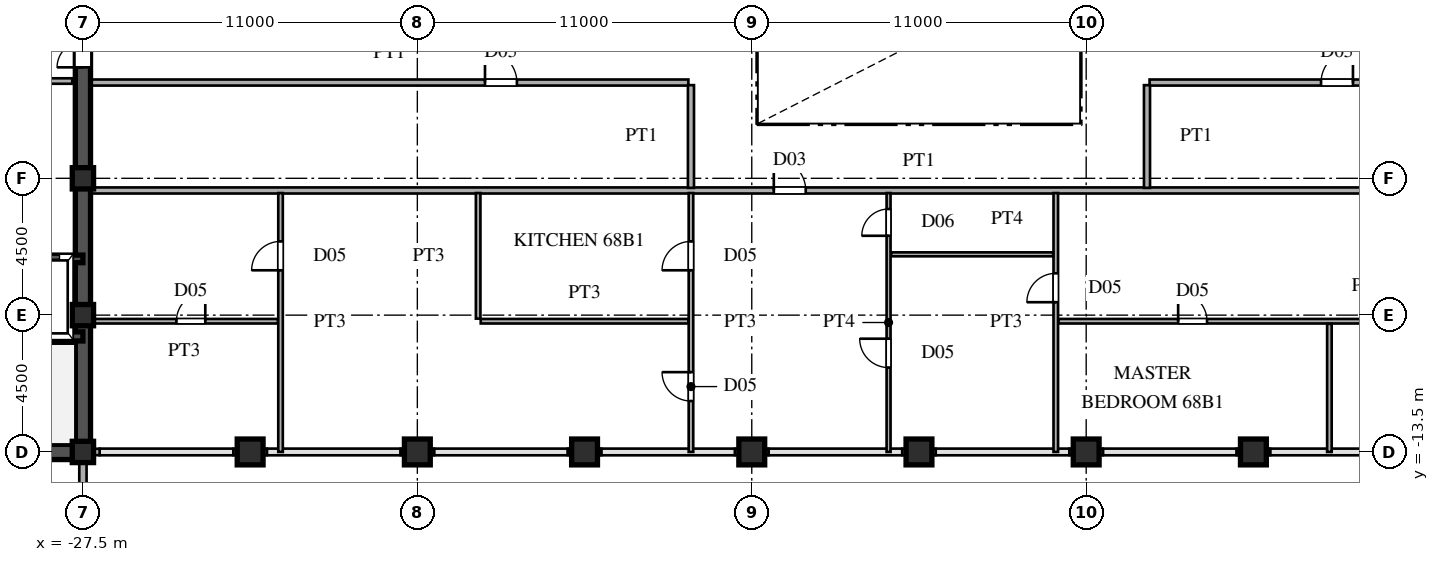
"""IFC4 building model, lengths in metres.
Left out: names, types, materials, properties, quantities, classifications, styles, units other than length and angle.
Written with IfcOpenShell. Run it as: python <this file> out.ifc"""

import sys

from ifc_helpers import new_model, si_unit, direction, frame, frame_2d, origin, origin_2d, place, context, subcontext, project, spatial, rectangle, hollow_rectangle, extrude, source, transform, mapped, element, fill, save


model = new_model("IFC4")
c1 = context("Model", 3, precision=1e-05, world=origin(), true_north=direction((0.0, 1.0)))
c2 = subcontext(c1, "Body", "Model", "MODEL_VIEW")
j1 = project(units=[si_unit("LENGTHUNIT", "METRE"), si_unit("PLANEANGLEUNIT", "RADIAN")], contexts=[c1])
p1 = place(None, origin())
s1 = spatial("IfcSite", under=j1, at=p1, CompositionType="ELEMENT")
p2 = place(p1, origin())
s2 = spatial("IfcBuilding", under=s1, at=p2, CompositionType="ELEMENT")
p3 = place(p2, frame((0.0, 0.0, 258.15)))
s3 = spatial("IfcBuildingStorey", under=s2, at=p3, CompositionType="ELEMENT", Elevation=258.15)
m1 = source(origin(), c2, "Body", "SweptSolid", [
    extrude(hollow_rectangle(XDim=0.7, YDim=0.7, WallThickness=0.03, at=origin_2d()), origin(), (0.0, 0.0, 1.0), 3.75),
])
for number, where, z_axis, x_axis in (
    (1, (-27.5, -13.5, 0.0), (0.0, 0.0, 1.0), (1.0, 0.0, 0.0)),
    (2, (-27.5, -9.0, 0.0), (0.0, 0.0, 1.0), (1.0, 0.0, 0.0)),
    (3, (-27.5, -4.5, 0.0), (0.0, 0.0, 1.0), (1.0, 0.0, 0.0)),
):
    element("IfcColumn", number, at=place(p3, frame(where, z_axis=z_axis, x_axis=x_axis)), inside=s3, PredefinedType="COLUMN", context=c2, shape_type="MappedRepresentation", body=[
        mapped(m1, transform((0.0, 0.0, 0.0), scale=1.0)),
    ])
m2 = source(origin(), c2, "Body", "SweptSolid", [
    extrude(hollow_rectangle(XDim=0.85, YDim=0.85, WallThickness=0.036, at=origin_2d()), origin(), (0.0, 0.0, 1.0), 3.75),
])
for number, where, z_axis, x_axis in (
    (4, (-22.0, -13.5, 0.0), (0.0, 0.0, 1.0), (1.0, 0.0, 0.0)),
    (5, (-16.5, -13.5, 0.0), (0.0, 0.0, 1.0), (1.0, 0.0, 0.0)),
    (6, (-11.0, -13.5, 0.0), (0.0, 0.0, 1.0), (1.0, 0.0, 0.0)),
    (7, (-5.5, -13.5, 0.0), (0.0, 0.0, 1.0), (1.0, 0.0, 0.0)),
    (8, (0.0, -13.5, 0.0), (0.0, 0.0, 1.0), (1.0, 0.0, 0.0)),
    (9, (5.5, -13.5, 0.0), (0.0, 0.0, 1.0), (1.0, 0.0, 0.0)),
    (10, (11.0, -13.5, 0.0), (0.0, 0.0, 1.0), (1.0, 0.0, 0.0)),
):
    element("IfcColumn", number, at=place(p3, frame(where, z_axis=z_axis, x_axis=x_axis)), inside=s3, PredefinedType="COLUMN", context=c2, shape_type="MappedRepresentation", body=[
        mapped(m2, transform((0.0, 0.0, 0.0), scale=1.0)),
    ])
p4 = place(p3, frame((-27.5, -15.98, 0.0), z_axis=(0.0, 0.0, 1.0), x_axis=(0.0, 1.0, 0.0)))
e11 = element("IfcWall", 11, at=p4, inside=s3, PredefinedType="SOLIDWALL", context=c2, shape_type="SweptSolid", body=[
    extrude(rectangle(XDim=1.605, YDim=0.24, at=frame_2d((0.803, 0.0))), origin(), (0.0, 0.0, 1.0), 3.53),
])
p5 = place(p3, frame((-27.5, -14.375, 0.0), z_axis=(0.0, 0.0, 1.0), x_axis=(0.0, 1.0, 0.0)))
e12 = element("IfcWall", 12, at=p5, inside=s3, PredefinedType="SOLIDWALL", context=c2, shape_type="SweptSolid", body=[
    extrude(rectangle(XDim=0.62, YDim=0.24, at=frame_2d((0.31, 0.0))), origin(), (0.0, 0.0, 1.0), 3.03),
])
p6 = place(p3, frame((-27.49, -13.5, 0.0), z_axis=(0.0, 0.0, 1.0), x_axis=(1.0, 0.0, 0.0)))
e13 = element("IfcWall", 13, at=p6, inside=s3, PredefinedType="SOLIDWALL", context=c2, shape_type="SweptSolid", body=[
    extrude(rectangle(XDim=0.54, YDim=0.21, at=frame_2d((0.27, 0.0))), origin(), (0.0, 0.0, 1.0), 3.03),
])
for number, where, z_axis, x_axis in (
    (14, (-22.55, -13.5, 0.0), (0.0, 0.0, 1.0), (1.0, 0.0, 0.0)),
    (15, (-17.05, -13.5, 0.0), (0.0, 0.0, 1.0), (1.0, 0.0, 0.0)),
    (16, (-11.55, -13.5, 0.0), (0.0, 0.0, 1.0), (1.0, 0.0, 0.0)),
    (17, (-6.05, -13.5, 0.0), (0.0, 0.0, 1.0), (1.0, 0.0, 0.0)),
    (18, (-0.55, -13.5, 0.0), (0.0, 0.0, 1.0), (1.0, 0.0, 0.0)),
    (19, (4.95, -13.5, 0.0), (0.0, 0.0, 1.0), (1.0, 0.0, 0.0)),
    (20, (10.45, -13.5, 0.0), (0.0, 0.0, 1.0), (1.0, 0.0, 0.0)),
):
    element("IfcWall", number, at=place(p3, frame(where, z_axis=z_axis, x_axis=x_axis)), inside=s3, PredefinedType="SOLIDWALL", context=c2, shape_type="SweptSolid", body=[
        extrude(rectangle(XDim=1.1, YDim=0.21, at=frame_2d((0.55, 0.0))), origin(), (0.0, 0.0, 1.0), 3.03),
    ])
p7 = place(p3, frame((-27.5, -13.5, 0.0), z_axis=(0.0, 0.0, 1.0), x_axis=(0.0, 1.0, 0.0)))
e21 = element("IfcWall", 21, at=p7, inside=s3, PredefinedType="SHEAR", context=c2, shape_type="SweptSolid", body=[
    extrude(rectangle(XDim=12.2, YDim=0.5, at=frame_2d((6.1, 0.0))), origin(), (0.0, 0.0, 1.0), 3.53),
])
p8 = place(p3, frame((-27.5, -1.3, 0.0), z_axis=(0.0, 0.0, 1.0), x_axis=(0.0, 1.0, 0.0)))
e22 = element("IfcWall", 22, at=p8, inside=s3, PredefinedType="SHEAR", context=c2, shape_type="SweptSolid", body=[
    extrude(rectangle(XDim=2.6, YDim=0.5, at=frame_2d((1.3, 0.0))), origin(), (0.0, 0.0, 1.0), 3.53),
])
p9 = place(p8, frame((0.45, 0.0, 0.0)))
e23 = element("IfcOpeningElement", 23, at=p9, cuts=e22, PredefinedType="OPENING", context=c2, shape_type="SweptSolid", body=[
    extrude(rectangle(XDim=1.7, YDim=2.35, at=frame_2d((0.85, 1.175))), frame((0.0, 0.26, 0.0), z_axis=(0.0, -1.0, 0.0), x_axis=(1.0, 0.0, 0.0)), (0.0, 0.0, 1.0), 0.52),
])
p10 = place(p3, frame((-36.5, -13.5, 0.0), z_axis=(0.0, 0.0, 1.0), x_axis=(1.0, 0.0, 0.0)))
e24 = element("IfcWall", 24, at=p10, inside=s3, PredefinedType="SHEAR", context=c2, shape_type="SweptSolid", body=[
    extrude(rectangle(XDim=9.0, YDim=0.5, at=frame_2d((4.5, 0.0))), origin(), (0.0, 0.0, 1.0), 3.53),
])
p11 = place(p3, frame((-36.5, -9.7, 0.0), z_axis=(0.0, 0.0, 1.0), x_axis=(1.0, 0.0, 0.0)))
e25 = element("IfcWall", 25, at=p11, inside=s3, PredefinedType="SHEAR", context=c2, shape_type="SweptSolid", body=[
    extrude(rectangle(XDim=9.0, YDim=0.3, at=frame_2d((4.5, 0.0))), origin(), (0.0, 0.0, 1.0), 3.53),
])
p12 = place(p11, frame((0.6, 0.0, 0.0)))
e26 = element("IfcOpeningElement", 26, at=p12, cuts=e25, PredefinedType="OPENING", context=c2, shape_type="SweptSolid", body=[
    extrude(rectangle(XDim=1.1, YDim=2.2, at=frame_2d((0.55, 1.1))), frame((0.0, 0.16, 0.0), z_axis=(0.0, -1.0, 0.0), x_axis=(1.0, 0.0, 0.0)), (0.0, 0.0, 1.0), 0.32),
])
p13 = place(p3, frame((-30.3, -7.15, 0.0), z_axis=(0.0, 0.0, 1.0), x_axis=(1.0, 0.0, 0.0)))
e27 = element("IfcWall", 27, at=p13, inside=s3, PredefinedType="SHEAR", context=c2, shape_type="SweptSolid", body=[
    extrude(rectangle(XDim=2.8, YDim=0.25, at=frame_2d((1.4, 0.0))), origin(), (0.0, 0.0, 1.0), 3.53),
])
p14 = place(p3, frame((-30.3, -1.3, 0.0), z_axis=(0.0, 0.0, 1.0), x_axis=(1.0, 0.0, 0.0)))
e28 = element("IfcWall", 28, at=p14, inside=s3, PredefinedType="PARTITIONING", context=c2, shape_type="SweptSolid", body=[
    extrude(rectangle(XDim=2.45, YDim=0.18, at=frame_2d((1.225, 0.0))), origin(), (0.0, 0.0, 1.0), 3.53),
])
p15 = place(p14, frame((0.275, 0.0, 0.0)))
e29 = element("IfcOpeningElement", 29, at=p15, cuts=e28, PredefinedType="OPENING", context=c2, shape_type="SweptSolid", body=[
    extrude(rectangle(XDim=0.95, YDim=2.15, at=frame_2d((0.475, 1.075))), frame((0.0, 0.1, 0.0), z_axis=(0.0, -1.0, 0.0), x_axis=(1.0, 0.0, 0.0)), (0.0, 0.0, 1.0), 0.2),
])
p16 = place(p3, frame((-27.245, -9.2, 0.0), z_axis=(0.0, 0.0, 1.0), x_axis=(1.0, 0.0, 0.0)))
e30 = element("IfcWall", 30, at=p16, inside=s3, PredefinedType="PARTITIONING", context=c2, shape_type="SweptSolid", body=[
    extrude(rectangle(XDim=6.16, YDim=0.15, at=frame_2d((3.08, 0.0))), origin(), (0.0, 0.0, 1.0), 3.53),
])
p17 = place(p16, frame((2.82, 0.0, 0.0)))
e31 = element("IfcOpeningElement", 31, at=p17, cuts=e30, PredefinedType="OPENING", context=c2, shape_type="SweptSolid", body=[
    extrude(rectangle(XDim=0.95, YDim=2.15, at=frame_2d((0.475, 1.075))), frame((0.0, 0.085, 0.0), z_axis=(0.0, -1.0, 0.0), x_axis=(1.0, 0.0, 0.0)), (0.0, 0.0, 1.0), 0.17),
])
p18 = place(p3, frame((-14.415, -9.2, 0.0), z_axis=(0.0, 0.0, 1.0), x_axis=(1.0, 0.0, 0.0)))
e32 = element("IfcWall", 32, at=p18, inside=s3, PredefinedType="PARTITIONING", context=c2, shape_type="SweptSolid", body=[
    extrude(rectangle(XDim=6.83, YDim=0.15, at=frame_2d((3.415, 0.0))), origin(), (0.0, 0.0, 1.0), 3.53),
])
p19 = place(p3, frame((4.585, -9.2, 0.0), z_axis=(0.0, 0.0, 1.0), x_axis=(1.0, 0.0, 0.0)))
e33 = element("IfcWall", 33, at=p19, inside=s3, PredefinedType="PARTITIONING", context=c2, shape_type="SweptSolid", body=[
    extrude(rectangle(XDim=22.66, YDim=0.15, at=frame_2d((11.33, 0.0))), origin(), (0.0, 0.0, 1.0), 3.53),
])
p20 = place(p19, frame((3.94, 0.0, 0.0)))
e34 = element("IfcOpeningElement", 34, at=p20, cuts=e33, PredefinedType="OPENING", context=c2, shape_type="SweptSolid", body=[
    extrude(rectangle(XDim=0.95, YDim=2.15, at=frame_2d((0.475, 1.075))), frame((0.0, 0.085, 0.0), z_axis=(0.0, -1.0, 0.0), x_axis=(1.0, 0.0, 0.0)), (0.0, 0.0, 1.0), 0.17),
])
p21 = place(p19, frame((11.94, 0.0, 0.0)))
e35 = element("IfcOpeningElement", 35, at=p21, cuts=e33, PredefinedType="OPENING", context=c2, shape_type="SweptSolid", body=[
    extrude(rectangle(XDim=0.95, YDim=2.15, at=frame_2d((0.475, 1.075))), frame((0.0, 0.085, 0.0), z_axis=(0.0, -1.0, 0.0), x_axis=(1.0, 0.0, 0.0)), (0.0, 0.0, 1.0), 0.17),
])
p22 = place(p19, frame((18.94, 0.0, 0.0)))
e36 = element("IfcOpeningElement", 36, at=p22, cuts=e33, PredefinedType="OPENING", context=c2, shape_type="SweptSolid", body=[
    extrude(rectangle(XDim=0.95, YDim=2.15, at=frame_2d((0.475, 1.075))), frame((0.0, 0.085, 0.0), z_axis=(0.0, -1.0, 0.0), x_axis=(1.0, 0.0, 0.0)), (0.0, 0.0, 1.0), 0.17),
])
p23 = place(p3, frame((-0.915, -7.0, 0.0), z_axis=(0.0, 0.0, 1.0), x_axis=(1.0, 0.0, 0.0)))
e37 = element("IfcWall", 37, at=p23, inside=s3, PredefinedType="PARTITIONING", context=c2, shape_type="SweptSolid", body=[
    extrude(rectangle(XDim=5.33, YDim=0.13, at=frame_2d((2.665, 0.0))), origin(), (0.0, 0.0, 1.0), 3.53),
])
p24 = place(p3, frame((-27.245, -4.9, 0.0), z_axis=(0.0, 0.0, 1.0), x_axis=(1.0, 0.0, 0.0)))
e38 = element("IfcWall", 38, at=p24, inside=s3, PredefinedType="PARTITIONING", context=c2, shape_type="SweptSolid", body=[
    extrude(rectangle(XDim=54.49, YDim=0.2, at=frame_2d((27.245, 0.0))), origin(), (0.0, 0.0, 1.0), 3.53),
])
p25 = place(p24, frame((22.47, 0.0, 0.0)))
e39 = element("IfcOpeningElement", 39, at=p25, cuts=e38, PredefinedType="OPENING", context=c2, shape_type="SweptSolid", body=[
    extrude(rectangle(XDim=1.05, YDim=2.25, at=frame_2d((0.525, 1.125))), frame((0.0, 0.11, 0.0), z_axis=(0.0, -1.0, 0.0), x_axis=(1.0, 0.0, 0.0)), (0.0, 0.0, 1.0), 0.22),
])
p26 = place(p3, frame((-27.245, -1.35, 0.0), z_axis=(0.0, 0.0, 1.0), x_axis=(1.0, 0.0, 0.0)))
e40 = element("IfcWall", 40, at=p26, inside=s3, PredefinedType="PARTITIONING", context=c2, shape_type="SweptSolid", body=[
    extrude(rectangle(XDim=19.66, YDim=0.2, at=frame_2d((9.83, 0.0))), origin(), (0.0, 0.0, 1.0), 3.53),
])
p27 = place(p26, frame((12.97, 0.0, 0.0)))
e41 = element("IfcOpeningElement", 41, at=p27, cuts=e40, PredefinedType="OPENING", context=c2, shape_type="SweptSolid", body=[
    extrude(rectangle(XDim=1.05, YDim=2.25, at=frame_2d((0.525, 1.125))), frame((0.0, 0.11, 0.0), z_axis=(0.0, -1.0, 0.0), x_axis=(1.0, 0.0, 0.0)), (0.0, 0.0, 1.0), 0.22),
])
p28 = place(p3, frame((7.585, -1.35, 0.0), z_axis=(0.0, 0.0, 1.0), x_axis=(1.0, 0.0, 0.0)))
e42 = element("IfcWall", 42, at=p28, inside=s3, PredefinedType="PARTITIONING", context=c2, shape_type="SweptSolid", body=[
    extrude(rectangle(XDim=19.66, YDim=0.2, at=frame_2d((9.83, 0.0))), origin(), (0.0, 0.0, 1.0), 3.53),
])
p29 = place(p28, frame((5.64, 0.0, 0.0)))
e43 = element("IfcOpeningElement", 43, at=p29, cuts=e42, PredefinedType="OPENING", context=c2, shape_type="SweptSolid", body=[
    extrude(rectangle(XDim=1.05, YDim=2.25, at=frame_2d((0.525, 1.125))), frame((0.0, 0.11, 0.0), z_axis=(0.0, -1.0, 0.0), x_axis=(1.0, 0.0, 0.0)), (0.0, 0.0, 1.0), 0.22),
])
p30 = place(p3, frame((-21.0, -13.5, 0.0), z_axis=(0.0, 0.0, 1.0), x_axis=(0.0, 1.0, 0.0)))
e44 = element("IfcWall", 44, at=p30, inside=s3, PredefinedType="PARTITIONING", context=c2, shape_type="SweptSolid", body=[
    extrude(rectangle(XDim=8.515, YDim=0.15, at=frame_2d((4.257, 0.0))), origin(), (0.0, 0.0, 1.0), 3.53),
])
p31 = place(p30, frame((5.975, 0.0, 0.0)))
e45 = element("IfcOpeningElement", 45, at=p31, cuts=e44, PredefinedType="OPENING", context=c2, shape_type="SweptSolid", body=[
    extrude(rectangle(XDim=0.95, YDim=2.15, at=frame_2d((0.475, 1.075))), frame((0.0, 0.085, 0.0), z_axis=(0.0, -1.0, 0.0), x_axis=(1.0, 0.0, 0.0)), (0.0, 0.0, 1.0), 0.17),
])
p32 = place(p3, frame((-14.5, -9.115, 0.0), z_axis=(0.0, 0.0, 1.0), x_axis=(0.0, 1.0, 0.0)))
e46 = element("IfcWall", 46, at=p32, inside=s3, PredefinedType="PARTITIONING", context=c2, shape_type="SweptSolid", body=[
    extrude(rectangle(XDim=4.13, YDim=0.15, at=frame_2d((2.065, 0.0))), origin(), (0.0, 0.0, 1.0), 3.53),
])
p33 = place(p3, frame((-7.5, -13.5, 0.0), z_axis=(0.0, 0.0, 1.0), x_axis=(0.0, 1.0, 0.0)))
e47 = element("IfcWall", 47, at=p33, inside=s3, PredefinedType="PARTITIONING", context=c2, shape_type="SweptSolid", body=[
    extrude(rectangle(XDim=8.515, YDim=0.15, at=frame_2d((4.257, 0.0))), origin(), (0.0, 0.0, 1.0), 3.53),
])
p34 = place(p33, frame((5.975, 0.0, 0.0)))
e48 = element("IfcOpeningElement", 48, at=p34, cuts=e47, PredefinedType="OPENING", context=c2, shape_type="SweptSolid", body=[
    extrude(rectangle(XDim=0.95, YDim=2.15, at=frame_2d((0.475, 1.075))), frame((0.0, 0.085, 0.0), z_axis=(0.0, -1.0, 0.0), x_axis=(1.0, 0.0, 0.0)), (0.0, 0.0, 1.0), 0.17),
])
p35 = place(p33, frame((1.675, 0.0, 0.0)))
e49 = element("IfcOpeningElement", 49, at=p35, cuts=e47, PredefinedType="OPENING", context=c2, shape_type="SweptSolid", body=[
    extrude(rectangle(XDim=0.95, YDim=2.15, at=frame_2d((0.475, 1.075))), frame((0.0, 0.085, 0.0), z_axis=(0.0, -1.0, 0.0), x_axis=(1.0, 0.0, 0.0)), (0.0, 0.0, 1.0), 0.17),
])
p36 = place(p3, frame((-7.5, -4.815, 0.0), z_axis=(0.0, 0.0, 1.0), x_axis=(0.0, 1.0, 0.0)))
e50 = element("IfcWall", 50, at=p36, inside=s3, PredefinedType="PARTITIONING", context=c2, shape_type="SweptSolid", body=[
    extrude(rectangle(XDim=3.38, YDim=0.2, at=frame_2d((1.69, 0.0))), origin(), (0.0, 0.0, 1.0), 3.53),
])
p37 = place(p3, frame((-1.0, -13.5, 0.0), z_axis=(0.0, 0.0, 1.0), x_axis=(0.0, 1.0, 0.0)))
e51 = element("IfcWall", 51, at=p37, inside=s3, PredefinedType="PARTITIONING", context=c2, shape_type="SweptSolid", body=[
    extrude(rectangle(XDim=8.515, YDim=0.13, at=frame_2d((4.257, 0.0))), origin(), (0.0, 0.0, 1.0), 3.53),
])
p38 = place(p37, frame((7.11, 0.0, 0.0)))
e52 = element("IfcOpeningElement", 52, at=p38, cuts=e51, PredefinedType="OPENING", context=c2, shape_type="SweptSolid", body=[
    extrude(rectangle(XDim=0.88, YDim=2.1, at=frame_2d((0.44, 1.05))), frame((0.0, 0.075, 0.0), z_axis=(0.0, -1.0, 0.0), x_axis=(1.0, 0.0, 0.0)), (0.0, 0.0, 1.0), 0.15),
])
p39 = place(p37, frame((2.775, 0.0, 0.0)))
e53 = element("IfcOpeningElement", 53, at=p39, cuts=e51, PredefinedType="OPENING", context=c2, shape_type="SweptSolid", body=[
    extrude(rectangle(XDim=0.95, YDim=2.15, at=frame_2d((0.475, 1.075))), frame((0.0, 0.075, 0.0), z_axis=(0.0, -1.0, 0.0), x_axis=(1.0, 0.0, 0.0)), (0.0, 0.0, 1.0), 0.15),
])
p40 = place(p3, frame((4.5, -13.5, 0.0), z_axis=(0.0, 0.0, 1.0), x_axis=(0.0, 1.0, 0.0)))
e54 = element("IfcWall", 54, at=p40, inside=s3, PredefinedType="PARTITIONING", context=c2, shape_type="SweptSolid", body=[
    extrude(rectangle(XDim=8.515, YDim=0.15, at=frame_2d((4.257, 0.0))), origin(), (0.0, 0.0, 1.0), 3.53),
])
p41 = place(p40, frame((4.925, 0.0, 0.0)))
e55 = element("IfcOpeningElement", 55, at=p41, cuts=e54, PredefinedType="OPENING", context=c2, shape_type="SweptSolid", body=[
    extrude(rectangle(XDim=0.95, YDim=2.15, at=frame_2d((0.475, 1.075))), frame((0.0, 0.085, 0.0), z_axis=(0.0, -1.0, 0.0), x_axis=(1.0, 0.0, 0.0)), (0.0, 0.0, 1.0), 0.17),
])
p42 = place(p3, frame((7.5, -4.815, 0.0), z_axis=(0.0, 0.0, 1.0), x_axis=(0.0, 1.0, 0.0)))
e56 = element("IfcWall", 56, at=p42, inside=s3, PredefinedType="PARTITIONING", context=c2, shape_type="SweptSolid", body=[
    extrude(rectangle(XDim=3.38, YDim=0.2, at=frame_2d((1.69, 0.0))), origin(), (0.0, 0.0, 1.0), 3.53),
])
p43 = place(p3, frame((13.5, -13.5, 0.0), z_axis=(0.0, 0.0, 1.0), x_axis=(0.0, 1.0, 0.0)))
e57 = element("IfcWall", 57, at=p43, inside=s3, PredefinedType="PARTITIONING", context=c2, shape_type="SweptSolid", body=[
    extrude(rectangle(XDim=4.215, YDim=0.15, at=frame_2d((2.107, 0.0))), origin(), (0.0, 0.0, 1.0), 3.53),
])
m3 = source(origin(), c2, "Body", "SweptSolid", [
    extrude(rectangle(XDim=1.7, YDim=2.35, at=frame_2d((0.85, 1.175))), frame((0.0, 0.025, 0.0), z_axis=(0.0, -1.0, 0.0), x_axis=(1.0, 0.0, 0.0)), (0.0, 0.0, 1.0), 0.05),
])
p44 = place(p9, origin())
e58 = element("IfcDoor", 58, at=p44, inside=s3, OperationType="DOUBLE_SWING_LEFT", PredefinedType="DOOR", context=c2, shape_type="MappedRepresentation", body=[
    mapped(m3, transform((0.0, 0.0, 0.0), scale=1.0)),
])
fill(e23, e58)
m4 = source(origin(), c2, "Body", "SweptSolid", [
    extrude(rectangle(XDim=0.95, YDim=2.15, at=frame_2d((0.475, 1.075))), frame((0.0, 0.025, 0.0), z_axis=(0.0, -1.0, 0.0), x_axis=(1.0, 0.0, 0.0)), (0.0, 0.0, 1.0), 0.05),
])
p45 = place(p17, origin())
e59 = element("IfcDoor", 59, at=p45, inside=s3, OperationType="SINGLE_SWING_RIGHT", PredefinedType="DOOR", context=c2, shape_type="MappedRepresentation", body=[
    mapped(m4, transform((0.0, 0.0, 0.0), scale=1.0)),
])
fill(e31, e59)
p46 = place(p20, origin())
e60 = element("IfcDoor", 60, at=p46, inside=s3, OperationType="SINGLE_SWING_LEFT", PredefinedType="DOOR", context=c2, shape_type="MappedRepresentation", body=[
    mapped(m4, transform((0.0, 0.0, 0.0), scale=1.0)),
])
fill(e34, e60)
m5 = source(origin(), c2, "Body", "SweptSolid", [
    extrude(rectangle(XDim=1.05, YDim=2.25, at=frame_2d((0.525, 1.125))), frame((0.0, 0.025, 0.0), z_axis=(0.0, -1.0, 0.0), x_axis=(1.0, 0.0, 0.0)), (0.0, 0.0, 1.0), 0.05),
])
p47 = place(p25, origin())
e61 = element("IfcDoor", 61, at=p47, inside=s3, OperationType="SINGLE_SWING_LEFT", PredefinedType="DOOR", context=c2, shape_type="MappedRepresentation", body=[
    mapped(m5, transform((0.0, 0.0, 0.0), scale=1.0)),
])
fill(e39, e61)
p48 = place(p27, origin())
e62 = element("IfcDoor", 62, at=p48, inside=s3, OperationType="SINGLE_SWING_LEFT", PredefinedType="DOOR", context=c2, shape_type="MappedRepresentation", body=[
    mapped(m5, transform((0.0, 0.0, 0.0), scale=1.0)),
])
fill(e41, e62)
p49 = place(p29, origin())
e63 = element("IfcDoor", 63, at=p49, inside=s3, OperationType="SINGLE_SWING_RIGHT", PredefinedType="DOOR", context=c2, shape_type="MappedRepresentation", body=[
    mapped(m5, transform((0.0, 0.0, 0.0), scale=1.0)),
])
fill(e43, e63)
p50 = place(p31, origin())
e64 = element("IfcDoor", 64, at=p50, inside=s3, OperationType="SINGLE_SWING_LEFT", PredefinedType="DOOR", context=c2, shape_type="MappedRepresentation", body=[
    mapped(m4, transform((0.0, 0.0, 0.0), scale=1.0)),
])
fill(e45, e64)
p51 = place(p34, origin())
e65 = element("IfcDoor", 65, at=p51, inside=s3, OperationType="SINGLE_SWING_LEFT", PredefinedType="DOOR", context=c2, shape_type="MappedRepresentation", body=[
    mapped(m4, transform((0.0, 0.0, 0.0), scale=1.0)),
])
fill(e48, e65)
p52 = place(p35, origin())
e66 = element("IfcDoor", 66, at=p52, inside=s3, OperationType="SINGLE_SWING_RIGHT", PredefinedType="DOOR", context=c2, shape_type="MappedRepresentation", body=[
    mapped(m4, transform((0.0, 0.0, 0.0), scale=1.0)),
])
fill(e49, e66)
m6 = source(origin(), c2, "Body", "SweptSolid", [
    extrude(rectangle(XDim=0.88, YDim=2.1, at=frame_2d((0.44, 1.05))), frame((0.0, 0.025, 0.0), z_axis=(0.0, -1.0, 0.0), x_axis=(1.0, 0.0, 0.0)), (0.0, 0.0, 1.0), 0.05),
])
p53 = place(p38, origin())
e67 = element("IfcDoor", 67, at=p53, inside=s3, OperationType="SINGLE_SWING_LEFT", PredefinedType="DOOR", context=c2, shape_type="MappedRepresentation", body=[
    mapped(m6, transform((0.0, 0.0, 0.0), scale=1.0)),
])
fill(e52, e67)
p54 = place(p39, origin())
e68 = element("IfcDoor", 68, at=p54, inside=s3, OperationType="SINGLE_SWING_RIGHT", PredefinedType="DOOR", context=c2, shape_type="MappedRepresentation", body=[
    mapped(m4, transform((0.0, 0.0, 0.0), scale=1.0)),
])
fill(e53, e68)
p55 = place(p41, origin())
e69 = element("IfcDoor", 69, at=p55, inside=s3, OperationType="SINGLE_SWING_LEFT", PredefinedType="DOOR", context=c2, shape_type="MappedRepresentation", body=[
    mapped(m4, transform((0.0, 0.0, 0.0), scale=1.0)),
])
fill(e55, e69)
save(model, sys.argv[1])
